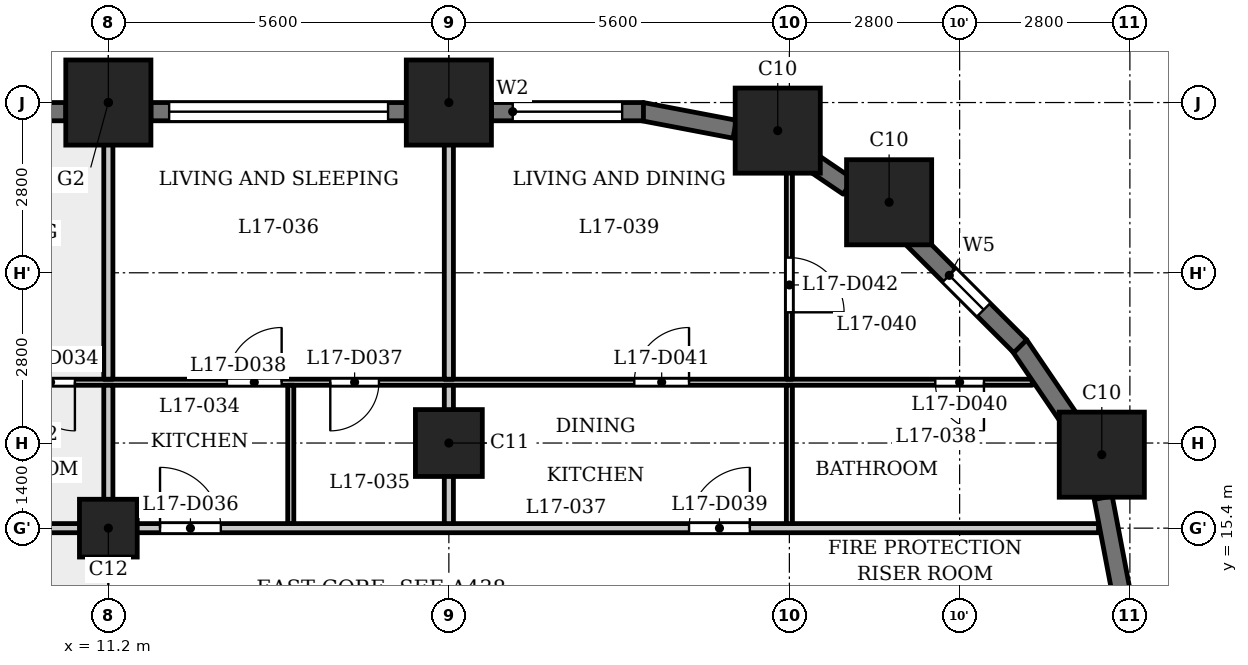
"""IFC4 building model, lengths in metres.
Left out: names, types, materials, properties, quantities, classifications, styles, units other than length and angle.
Written with IfcOpenShell. Run it as: python <this file> out.ifc"""

import sys

from ifc_helpers import new_model, si_unit, direction, frame, frame_2d, origin, origin_2d, place, context, subcontext, project, spatial, rectangle, extrude, element, fill, save


model = new_model("IFC4")
c1 = context("Model", 3, precision=1e-05, world=origin(), true_north=direction((0.0, 1.0)))
c2 = subcontext(c1, "Body", "Model", "MODEL_VIEW")
j1 = project(units=[si_unit("LENGTHUNIT", "METRE"), si_unit("PLANEANGLEUNIT", "RADIAN")], contexts=[c1])
p1 = place(None, origin())
s1 = spatial("IfcSite", under=j1, at=p1, CompositionType="ELEMENT")
p2 = place(p1, origin())
s2 = spatial("IfcBuilding", under=s1, at=p2, CompositionType="ELEMENT")
p3 = place(p2, frame((0.0, 0.0, 69.0)))
s3 = spatial("IfcBuildingStorey", under=s2, at=p3, CompositionType="ELEMENT", Elevation=69.0)
for number, where, z_axis, x_axis in (
    (1, (27.538, 16.609, 0.0), (0.0, 0.0, 1.0), (1.0, 0.0, 0.0)),
    (2, (24.04, 20.76, 0.0), (0.0, 0.0, 1.0), (1.0, 0.0, 0.0)),
    (3, (22.209, 21.938, 0.0), (0.0, 0.0, 1.0), (1.0, 0.0, 0.0)),
    (4, (16.8, 22.4, 0.0), (0.0, 0.0, 1.0), (1.0, 0.0, 0.0)),
    (5, (11.2, 22.4, 0.0), (0.0, 0.0, 1.0), (1.0, 0.0, 0.0)),
):
    element("IfcColumn", number, at=place(p3, frame(where, z_axis=z_axis, x_axis=x_axis)), inside=s3, PredefinedType="COLUMN", context=c2, shape_type="SweptSolid", body=[
        extrude(rectangle(XDim=1.4, YDim=1.4, at=origin_2d()), origin(), (0.0, 0.0, 1.0), 3.5),
    ])
p4 = place(p3, frame((16.8, 16.8, 0.0), z_axis=(0.0, 0.0, 1.0), x_axis=(1.0, 0.0, 0.0)))
e6 = element("IfcColumn", 6, at=p4, inside=s3, PredefinedType="COLUMN", context=c2, shape_type="SweptSolid", body=[
    extrude(rectangle(XDim=1.1, YDim=1.1, at=origin_2d()), origin(), (0.0, 0.0, 1.0), 3.5),
])
p5 = place(p3, frame((11.2, 15.4, 0.0), z_axis=(0.0, 0.0, 1.0), x_axis=(1.0, 0.0, 0.0)))
e7 = element("IfcColumn", 7, at=p5, inside=s3, PredefinedType="COLUMN", context=c2, shape_type="SweptSolid", body=[
    extrude(rectangle(XDim=0.95, YDim=0.95, at=origin_2d()), origin(), (0.0, 0.0, 1.0), 3.5),
])
for number, where, z_axis, x_axis in (
    (8, (27.853, 14.372, 0.0), (0.0, 0.0, 1.0), (-0.187, 0.982, 0.0)),
    (9, (27.053, 17.126, 0.0), (0.0, 0.0, 1.0), (-0.562, 0.827, 0.0)),
):
    element("IfcWall", number, at=place(p3, frame(where, z_axis=z_axis, x_axis=x_axis)), inside=s3, PredefinedType="SOLIDWALL", context=c2, shape_type="SweptSolid", body=[
        extrude(rectangle(XDim=1.556, YDim=0.3, at=frame_2d((0.778, 0.0))), origin(), (0.0, 0.0, 1.0), 2.3),
    ])
p6 = place(p3, frame((26.197, 18.391, 0.0), z_axis=(0.0, 0.0, 1.0), x_axis=(-0.707057949532, 0.707155609469, 0.0)))
e10 = element("IfcWall", 10, at=p6, inside=s3, PredefinedType="SOLIDWALL", context=c2, shape_type="SweptSolid", body=[
    extrude(rectangle(XDim=2.5, YDim=0.3, at=frame_2d((1.25, 0.0))), origin(), (0.0, 0.0, 1.0), 2.3),
])
p7 = place(p6, frame((0.85, 0.0, 0.6)))
e11 = element("IfcOpeningElement", 11, at=p7, cuts=e10, PredefinedType="OPENING", context=c2, shape_type="SweptSolid", body=[
    extrude(rectangle(XDim=0.8, YDim=1.55, at=frame_2d((0.4, 0.775))), frame((0.0, 0.16, 0.0), z_axis=(0.0, -1.0, 0.0), x_axis=(1.0, 0.0, 0.0)), (0.0, 0.0, 1.0), 0.32),
])
p8 = place(p3, frame((23.368, 21.017, 0.0), z_axis=(0.0, 0.0, 1.0), x_axis=(-0.827037530089, 0.562146710232, 0.0)))
e12 = element("IfcWall", 12, at=p8, inside=s3, PredefinedType="SOLIDWALL", context=c2, shape_type="SweptSolid", body=[
    extrude(rectangle(XDim=0.777, YDim=0.3, at=frame_2d((0.388, 0.0))), origin(), (0.0, 0.0, 1.0), 3.15),
])
p9 = place(p3, frame((21.5, 21.961, 0.0), z_axis=(0.0, 0.0, 1.0), x_axis=(-0.982297345734, 0.187328386968, 0.0)))
e13 = element("IfcWall", 13, at=p9, inside=s3, PredefinedType="SOLIDWALL", context=c2, shape_type="SweptSolid", body=[
    extrude(rectangle(XDim=1.556, YDim=0.3, at=frame_2d((0.778, 0.0))), origin(), (0.0, 0.0, 1.0), 2.3),
])
p10 = place(p3, frame((20.0, 22.25, 0.0), z_axis=(0.0, 0.0, 1.0), x_axis=(-1.0, 0.0, 0.0)))
e14 = element("IfcWall", 14, at=p10, inside=s3, PredefinedType="SOLIDWALL", context=c2, shape_type="SweptSolid", body=[
    extrude(rectangle(XDim=2.5, YDim=0.3, at=frame_2d((1.25, 0.0))), origin(), (0.0, 0.0, 1.0), 2.3),
])
p11 = place(p10, frame((0.35, 0.0, 0.9)))
e15 = element("IfcOpeningElement", 15, at=p11, cuts=e14, PredefinedType="OPENING", context=c2, shape_type="SweptSolid", body=[
    extrude(rectangle(XDim=1.8, YDim=1.25, at=frame_2d((0.9, 0.625))), frame((0.0, 0.16, 0.0), z_axis=(0.0, -1.0, 0.0), x_axis=(1.0, 0.0, 0.0)), (0.0, 0.0, 1.0), 0.32),
])
p12 = place(p3, frame((16.1, 22.25, 0.0), z_axis=(0.0, 0.0, 1.0), x_axis=(-1.0, 0.0, 0.0)))
e16 = element("IfcWall", 16, at=p12, inside=s3, PredefinedType="SOLIDWALL", context=c2, shape_type="SweptSolid", body=[
    extrude(rectangle(XDim=4.2, YDim=0.3, at=frame_2d((2.1, 0.0))), origin(), (0.0, 0.0, 1.0), 2.3),
])
p13 = place(p12, frame((0.3, 0.0, 1.2)))
e17 = element("IfcOpeningElement", 17, at=p13, cuts=e16, PredefinedType="OPENING", context=c2, shape_type="SweptSolid", body=[
    extrude(rectangle(XDim=3.6, YDim=0.95, at=frame_2d((1.8, 0.475))), frame((0.0, 0.16, 0.0), z_axis=(0.0, -1.0, 0.0), x_axis=(1.0, 0.0, 0.0)), (0.0, 0.0, 1.0), 0.32),
])
p14 = place(p3, frame((10.5, 22.25, 0.0), z_axis=(0.0, 0.0, 1.0), x_axis=(-1.0, 0.0, 0.0)))
e18 = element("IfcWall", 18, at=p14, inside=s3, PredefinedType="SOLIDWALL", context=c2, shape_type="SweptSolid", body=[
    extrude(rectangle(XDim=4.2, YDim=0.3, at=frame_2d((2.1, 0.0))), origin(), (0.0, 0.0, 1.0), 2.3),
])
p15 = place(p14, frame((0.3, 0.0, 1.2)))
e19 = element("IfcOpeningElement", 19, at=p15, cuts=e18, PredefinedType="OPENING", context=c2, shape_type="SweptSolid", body=[
    extrude(rectangle(XDim=3.6, YDim=0.95, at=frame_2d((1.8, 0.475))), frame((0.0, 0.16, 0.0), z_axis=(0.0, -1.0, 0.0), x_axis=(1.0, 0.0, 0.0)), (0.0, 0.0, 1.0), 0.32),
])
p16 = place(p3, frame((-27.484, 15.4, 0.0), z_axis=(0.0, 0.0, 1.0), x_axis=(1.0, 0.0, 0.0)))
e20 = element("IfcWall", 20, at=p16, inside=s3, PredefinedType="PARTITIONING", context=c2, shape_type="SweptSolid", body=[
    extrude(rectangle(XDim=54.968, YDim=0.15, at=frame_2d((27.484, 0.0))), origin(), (0.0, 0.0, 1.0), 3.15),
])
p17 = place(p16, frame((8.784, 0.0, 0.0)))
e21 = element("IfcOpeningElement", 21, at=p17, cuts=e20, PredefinedType="OPENING", context=c2, shape_type="SweptSolid", body=[
    extrude(rectangle(XDim=1.0, YDim=2.1, at=frame_2d((0.5, 1.05))), frame((0.0, 0.085, 0.0), z_axis=(0.0, -1.0, 0.0), x_axis=(1.0, 0.0, 0.0)), (0.0, 0.0, 1.0), 0.17),
])
p18 = place(p16, frame((14.634, 0.0, 0.0)))
e22 = element("IfcOpeningElement", 22, at=p18, cuts=e20, PredefinedType="OPENING", context=c2, shape_type="SweptSolid", body=[
    extrude(rectangle(XDim=1.0, YDim=2.1, at=frame_2d((0.5, 1.05))), frame((0.0, 0.085, 0.0), z_axis=(0.0, -1.0, 0.0), x_axis=(1.0, 0.0, 0.0)), (0.0, 0.0, 1.0), 0.17),
])
p19 = place(p16, frame((19.484, 0.0, 0.0)))
e23 = element("IfcOpeningElement", 23, at=p19, cuts=e20, PredefinedType="OPENING", context=c2, shape_type="SweptSolid", body=[
    extrude(rectangle(XDim=1.0, YDim=2.1, at=frame_2d((0.5, 1.05))), frame((0.0, 0.085, 0.0), z_axis=(0.0, -1.0, 0.0), x_axis=(1.0, 0.0, 0.0)), (0.0, 0.0, 1.0), 0.17),
])
p20 = place(p16, frame((23.634, 0.0, 0.0)))
e24 = element("IfcOpeningElement", 24, at=p20, cuts=e20, PredefinedType="OPENING", context=c2, shape_type="SweptSolid", body=[
    extrude(rectangle(XDim=1.0, YDim=2.1, at=frame_2d((0.5, 1.05))), frame((0.0, 0.085, 0.0), z_axis=(0.0, -1.0, 0.0), x_axis=(1.0, 0.0, 0.0)), (0.0, 0.0, 1.0), 0.17),
])
p21 = place(p16, frame((28.234, 0.0, 0.0)))
e25 = element("IfcOpeningElement", 25, at=p21, cuts=e20, PredefinedType="OPENING", context=c2, shape_type="SweptSolid", body=[
    extrude(rectangle(XDim=1.0, YDim=2.1, at=frame_2d((0.5, 1.05))), frame((0.0, 0.085, 0.0), z_axis=(0.0, -1.0, 0.0), x_axis=(1.0, 0.0, 0.0)), (0.0, 0.0, 1.0), 0.17),
])
p22 = place(p16, frame((33.784, 0.0, 0.0)))
e26 = element("IfcOpeningElement", 26, at=p22, cuts=e20, PredefinedType="OPENING", context=c2, shape_type="SweptSolid", body=[
    extrude(rectangle(XDim=1.0, YDim=2.1, at=frame_2d((0.5, 1.05))), frame((0.0, 0.085, 0.0), z_axis=(0.0, -1.0, 0.0), x_axis=(1.0, 0.0, 0.0)), (0.0, 0.0, 1.0), 0.17),
])
p23 = place(p16, frame((39.534, 0.0, 0.0)))
e27 = element("IfcOpeningElement", 27, at=p23, cuts=e20, PredefinedType="OPENING", context=c2, shape_type="SweptSolid", body=[
    extrude(rectangle(XDim=1.0, YDim=2.1, at=frame_2d((0.5, 1.05))), frame((0.0, 0.085, 0.0), z_axis=(0.0, -1.0, 0.0), x_axis=(1.0, 0.0, 0.0)), (0.0, 0.0, 1.0), 0.17),
])
p24 = place(p16, frame((48.234, 0.0, 0.0)))
e28 = element("IfcOpeningElement", 28, at=p24, cuts=e20, PredefinedType="OPENING", context=c2, shape_type="SweptSolid", body=[
    extrude(rectangle(XDim=1.0, YDim=2.1, at=frame_2d((0.5, 1.05))), frame((0.0, 0.085, 0.0), z_axis=(0.0, -1.0, 0.0), x_axis=(1.0, 0.0, 0.0)), (0.0, 0.0, 1.0), 0.17),
])
p25 = place(p3, frame((-26.64, 17.8, 0.0), z_axis=(0.0, 0.0, 1.0), x_axis=(1.0, 0.0, 0.0)))
e29 = element("IfcWall", 29, at=p25, inside=s3, PredefinedType="PARTITIONING", context=c2, shape_type="SweptSolid", body=[
    extrude(rectangle(XDim=53.034, YDim=0.1, at=frame_2d((26.517, 0.0))), origin(), (0.0, 0.0, 1.0), 3.15),
])
p26 = place(p25, frame((2.872, 0.0, 0.0)))
e30 = element("IfcOpeningElement", 30, at=p26, cuts=e29, PredefinedType="OPENING", context=c2, shape_type="SweptSolid", body=[
    extrude(rectangle(XDim=0.8, YDim=2.1, at=frame_2d((0.4, 1.05))), frame((0.0, 0.06, 0.0), z_axis=(0.0, -1.0, 0.0), x_axis=(1.0, 0.0, 0.0)), (0.0, 0.0, 1.0), 0.12),
])
p27 = place(p25, frame((7.04, 0.0, 0.0)))
e31 = element("IfcOpeningElement", 31, at=p27, cuts=e29, PredefinedType="OPENING", context=c2, shape_type="SweptSolid", body=[
    extrude(rectangle(XDim=0.9, YDim=2.1, at=frame_2d((0.45, 1.05))), frame((0.0, 0.06, 0.0), z_axis=(0.0, -1.0, 0.0), x_axis=(1.0, 0.0, 0.0)), (0.0, 0.0, 1.0), 0.12),
])
p28 = place(p25, frame((10.74, 0.0, 0.0)))
e32 = element("IfcOpeningElement", 32, at=p28, cuts=e29, PredefinedType="OPENING", context=c2, shape_type="SweptSolid", body=[
    extrude(rectangle(XDim=0.8, YDim=2.1, at=frame_2d((0.4, 1.05))), frame((0.0, 0.06, 0.0), z_axis=(0.0, -1.0, 0.0), x_axis=(1.0, 0.0, 0.0)), (0.0, 0.0, 1.0), 0.12),
])
p29 = place(p25, frame((12.89, 0.0, 0.0)))
e33 = element("IfcOpeningElement", 33, at=p29, cuts=e29, PredefinedType="OPENING", context=c2, shape_type="SweptSolid", body=[
    extrude(rectangle(XDim=0.9, YDim=2.1, at=frame_2d((0.45, 1.05))), frame((0.0, 0.06, 0.0), z_axis=(0.0, -1.0, 0.0), x_axis=(1.0, 0.0, 0.0)), (0.0, 0.0, 1.0), 0.12),
])
p30 = place(p25, frame((16.34, 0.0, 0.0)))
e34 = element("IfcOpeningElement", 34, at=p30, cuts=e29, PredefinedType="OPENING", context=c2, shape_type="SweptSolid", body=[
    extrude(rectangle(XDim=0.8, YDim=2.1, at=frame_2d((0.4, 1.05))), frame((0.0, 0.06, 0.0), z_axis=(0.0, -1.0, 0.0), x_axis=(1.0, 0.0, 0.0)), (0.0, 0.0, 1.0), 0.12),
])
p31 = place(p25, frame((19.74, 0.0, 0.0)))
e35 = element("IfcOpeningElement", 35, at=p31, cuts=e29, PredefinedType="OPENING", context=c2, shape_type="SweptSolid", body=[
    extrude(rectangle(XDim=0.9, YDim=2.1, at=frame_2d((0.45, 1.05))), frame((0.0, 0.06, 0.0), z_axis=(0.0, -1.0, 0.0), x_axis=(1.0, 0.0, 0.0)), (0.0, 0.0, 1.0), 0.12),
])
p32 = place(p25, frame((25.09, 0.0, 0.0)))
e36 = element("IfcOpeningElement", 36, at=p32, cuts=e29, PredefinedType="OPENING", context=c2, shape_type="SweptSolid", body=[
    extrude(rectangle(XDim=0.8, YDim=2.1, at=frame_2d((0.4, 1.05))), frame((0.0, 0.06, 0.0), z_axis=(0.0, -1.0, 0.0), x_axis=(1.0, 0.0, 0.0)), (0.0, 0.0, 1.0), 0.12),
])
p33 = place(p25, frame((21.89, 0.0, 0.0)))
e37 = element("IfcOpeningElement", 37, at=p33, cuts=e29, PredefinedType="OPENING", context=c2, shape_type="SweptSolid", body=[
    extrude(rectangle(XDim=0.9, YDim=2.1, at=frame_2d((0.45, 1.05))), frame((0.0, 0.06, 0.0), z_axis=(0.0, -1.0, 0.0), x_axis=(1.0, 0.0, 0.0)), (0.0, 0.0, 1.0), 0.12),
])
p34 = place(p25, frame((30.69, 0.0, 0.0)))
e38 = element("IfcOpeningElement", 38, at=p34, cuts=e29, PredefinedType="OPENING", context=c2, shape_type="SweptSolid", body=[
    extrude(rectangle(XDim=0.8, YDim=2.1, at=frame_2d((0.4, 1.05))), frame((0.0, 0.06, 0.0), z_axis=(0.0, -1.0, 0.0), x_axis=(1.0, 0.0, 0.0)), (0.0, 0.0, 1.0), 0.12),
])
p35 = place(p25, frame((28.49, 0.0, 0.0)))
e39 = element("IfcOpeningElement", 39, at=p35, cuts=e29, PredefinedType="OPENING", context=c2, shape_type="SweptSolid", body=[
    extrude(rectangle(XDim=0.9, YDim=2.1, at=frame_2d((0.45, 1.05))), frame((0.0, 0.06, 0.0), z_axis=(0.0, -1.0, 0.0), x_axis=(1.0, 0.0, 0.0)), (0.0, 0.0, 1.0), 0.12),
])
p36 = place(p25, frame((36.49, 0.0, 0.0)))
e40 = element("IfcOpeningElement", 40, at=p36, cuts=e29, PredefinedType="OPENING", context=c2, shape_type="SweptSolid", body=[
    extrude(rectangle(XDim=0.8, YDim=2.1, at=frame_2d((0.4, 1.05))), frame((0.0, 0.06, 0.0), z_axis=(0.0, -1.0, 0.0), x_axis=(1.0, 0.0, 0.0)), (0.0, 0.0, 1.0), 0.12),
])
p37 = place(p25, frame((33.04, 0.0, 0.0)))
e41 = element("IfcOpeningElement", 41, at=p37, cuts=e29, PredefinedType="OPENING", context=c2, shape_type="SweptSolid", body=[
    extrude(rectangle(XDim=0.9, YDim=2.1, at=frame_2d((0.45, 1.05))), frame((0.0, 0.06, 0.0), z_axis=(0.0, -1.0, 0.0), x_axis=(1.0, 0.0, 0.0)), (0.0, 0.0, 1.0), 0.12),
])
p38 = place(p25, frame((41.49, 0.0, 0.0)))
e42 = element("IfcOpeningElement", 42, at=p38, cuts=e29, PredefinedType="OPENING", context=c2, shape_type="SweptSolid", body=[
    extrude(rectangle(XDim=0.8, YDim=2.1, at=frame_2d((0.4, 1.05))), frame((0.0, 0.06, 0.0), z_axis=(0.0, -1.0, 0.0), x_axis=(1.0, 0.0, 0.0)), (0.0, 0.0, 1.0), 0.12),
])
p39 = place(p25, frame((39.79, 0.0, 0.0)))
e43 = element("IfcOpeningElement", 43, at=p39, cuts=e29, PredefinedType="OPENING", context=c2, shape_type="SweptSolid", body=[
    extrude(rectangle(XDim=0.9, YDim=2.1, at=frame_2d((0.45, 1.05))), frame((0.0, 0.06, 0.0), z_axis=(0.0, -1.0, 0.0), x_axis=(1.0, 0.0, 0.0)), (0.0, 0.0, 1.0), 0.12),
])
p40 = place(p25, frame((51.44, 0.0, 0.0)))
e44 = element("IfcOpeningElement", 44, at=p40, cuts=e29, PredefinedType="OPENING", context=c2, shape_type="SweptSolid", body=[
    extrude(rectangle(XDim=0.8, YDim=2.1, at=frame_2d((0.4, 1.05))), frame((0.0, 0.06, 0.0), z_axis=(0.0, -1.0, 0.0), x_axis=(1.0, 0.0, 0.0)), (0.0, 0.0, 1.0), 0.12),
])
p41 = place(p25, frame((46.49, 0.0, 0.0)))
e45 = element("IfcOpeningElement", 45, at=p41, cuts=e29, PredefinedType="OPENING", context=c2, shape_type="SweptSolid", body=[
    extrude(rectangle(XDim=0.9, YDim=2.1, at=frame_2d((0.45, 1.05))), frame((0.0, 0.06, 0.0), z_axis=(0.0, -1.0, 0.0), x_axis=(1.0, 0.0, 0.0)), (0.0, 0.0, 1.0), 0.12),
])
p42 = place(p3, frame((11.2, 15.475, 0.0), z_axis=(0.0, 0.0, 1.0), x_axis=(0.0, 1.0, 0.0)))
e46 = element("IfcWall", 46, at=p42, inside=s3, PredefinedType="PARTITIONING", context=c2, shape_type="SweptSolid", body=[
    extrude(rectangle(XDim=2.275, YDim=0.15, at=frame_2d((1.137, 0.0))), origin(), (0.0, 0.0, 1.0), 3.15),
])
p43 = place(p3, frame((11.2, 17.85, 0.0), z_axis=(0.0, 0.0, 1.0), x_axis=(0.0, 1.0, 0.0)))
e47 = element("IfcWall", 47, at=p43, inside=s3, PredefinedType="PARTITIONING", context=c2, shape_type="SweptSolid", body=[
    extrude(rectangle(XDim=5.23, YDim=0.15, at=frame_2d((2.615, 0.0))), origin(), (0.0, 0.0, 1.0), 3.15),
])
p44 = place(p3, frame((14.2, 15.475, 0.0), z_axis=(0.0, 0.0, 1.0), x_axis=(0.0, 1.0, 0.0)))
e48 = element("IfcWall", 48, at=p44, inside=s3, PredefinedType="PARTITIONING", context=c2, shape_type="SweptSolid", body=[
    extrude(rectangle(XDim=2.275, YDim=0.1, at=frame_2d((1.137, 0.0))), origin(), (0.0, 0.0, 1.0), 3.15),
])
p45 = place(p3, frame((16.8, 15.475, 0.0), z_axis=(0.0, 0.0, 1.0), x_axis=(0.0, 1.0, 0.0)))
e49 = element("IfcWall", 49, at=p45, inside=s3, PredefinedType="PARTITIONING", context=c2, shape_type="SweptSolid", body=[
    extrude(rectangle(XDim=2.275, YDim=0.15, at=frame_2d((1.137, 0.0))), origin(), (0.0, 0.0, 1.0), 3.15),
])
p46 = place(p3, frame((16.8, 17.85, 0.0), z_axis=(0.0, 0.0, 1.0), x_axis=(0.0, 1.0, 0.0)))
e50 = element("IfcWall", 50, at=p46, inside=s3, PredefinedType="PARTITIONING", context=c2, shape_type="SweptSolid", body=[
    extrude(rectangle(XDim=5.23, YDim=0.15, at=frame_2d((2.615, 0.0))), origin(), (0.0, 0.0, 1.0), 3.15),
])
p47 = place(p3, frame((22.4, 15.475, 0.0), z_axis=(0.0, 0.0, 1.0), x_axis=(0.0, 1.0, 0.0)))
e51 = element("IfcWall", 51, at=p47, inside=s3, PredefinedType="PARTITIONING", context=c2, shape_type="SweptSolid", body=[
    extrude(rectangle(XDim=2.275, YDim=0.1, at=frame_2d((1.137, 0.0))), origin(), (0.0, 0.0, 1.0), 3.15),
])
p48 = place(p3, frame((22.4, 17.85, 0.0), z_axis=(0.0, 0.0, 1.0), x_axis=(0.0, 1.0, 0.0)))
e52 = element("IfcWall", 52, at=p48, inside=s3, PredefinedType="PARTITIONING", context=c2, shape_type="SweptSolid", body=[
    extrude(rectangle(XDim=3.87, YDim=0.1, at=frame_2d((1.935, 0.0))), origin(), (0.0, 0.0, 1.0), 3.15),
])
p49 = place(p48, frame((1.1, 0.0, 0.0)))
e53 = element("IfcOpeningElement", 53, at=p49, cuts=e52, PredefinedType="OPENING", context=c2, shape_type="SweptSolid", body=[
    extrude(rectangle(XDim=0.9, YDim=2.1, at=frame_2d((0.45, 1.05))), frame((0.0, 0.06, 0.0), z_axis=(0.0, -1.0, 0.0), x_axis=(1.0, 0.0, 0.0)), (0.0, 0.0, 1.0), 0.12),
])
p50 = place(p36, origin())
e54 = element("IfcDoor", 54, at=p50, inside=s3, OperationType="SINGLE_SWING_RIGHT", PredefinedType="DOOR", context=c2, shape_type="SweptSolid", body=[
    extrude(rectangle(XDim=0.8, YDim=2.1, at=frame_2d((0.4, 1.05))), frame((0.0, 0.025, 0.0), z_axis=(0.0, -1.0, 0.0), x_axis=(1.0, 0.0, 0.0)), (0.0, 0.0, 1.0), 0.05),
])
fill(e40, e54)
p51 = place(p23, origin())
e55 = element("IfcDoor", 55, at=p51, inside=s3, OperationType="SINGLE_SWING_RIGHT", PredefinedType="DOOR", context=c2, shape_type="SweptSolid", body=[
    extrude(rectangle(XDim=1.0, YDim=2.1, at=frame_2d((0.5, 1.05))), frame((0.0, 0.025, 0.0), z_axis=(0.0, -1.0, 0.0), x_axis=(1.0, 0.0, 0.0)), (0.0, 0.0, 1.0), 0.05),
])
fill(e27, e55)
p52 = place(p38, origin())
e56 = element("IfcDoor", 56, at=p52, inside=s3, OperationType="SINGLE_SWING_LEFT", PredefinedType="DOOR", context=c2, shape_type="SweptSolid", body=[
    extrude(rectangle(XDim=0.8, YDim=2.1, at=frame_2d((0.4, 1.05))), frame((0.0, 0.025, 0.0), z_axis=(0.0, -1.0, 0.0), x_axis=(1.0, 0.0, 0.0)), (0.0, 0.0, 1.0), 0.05),
])
fill(e42, e56)
p53 = place(p39, origin())
e57 = element("IfcDoor", 57, at=p53, inside=s3, OperationType="SINGLE_SWING_LEFT", PredefinedType="DOOR", context=c2, shape_type="SweptSolid", body=[
    extrude(rectangle(XDim=0.9, YDim=2.1, at=frame_2d((0.45, 1.05))), frame((0.0, 0.025, 0.0), z_axis=(0.0, -1.0, 0.0), x_axis=(1.0, 0.0, 0.0)), (0.0, 0.0, 1.0), 0.05),
])
fill(e43, e57)
p54 = place(p24, origin())
e58 = element("IfcDoor", 58, at=p54, inside=s3, OperationType="SINGLE_SWING_LEFT", PredefinedType="DOOR", context=c2, shape_type="SweptSolid", body=[
    extrude(rectangle(XDim=1.0, YDim=2.1, at=frame_2d((0.5, 1.05))), frame((0.0, 0.025, 0.0), z_axis=(0.0, -1.0, 0.0), x_axis=(1.0, 0.0, 0.0)), (0.0, 0.0, 1.0), 0.05),
])
fill(e28, e58)
p55 = place(p40, origin())
e59 = element("IfcDoor", 59, at=p55, inside=s3, OperationType="SINGLE_SWING_RIGHT", PredefinedType="DOOR", context=c2, shape_type="SweptSolid", body=[
    extrude(rectangle(XDim=0.8, YDim=2.1, at=frame_2d((0.4, 1.05))), frame((0.0, 0.025, 0.0), z_axis=(0.0, -1.0, 0.0), x_axis=(1.0, 0.0, 0.0)), (0.0, 0.0, 1.0), 0.05),
])
fill(e44, e59)
p56 = place(p41, origin())
e60 = element("IfcDoor", 60, at=p56, inside=s3, OperationType="SINGLE_SWING_LEFT", PredefinedType="DOOR", context=c2, shape_type="SweptSolid", body=[
    extrude(rectangle(XDim=0.9, YDim=2.1, at=frame_2d((0.45, 1.05))), frame((0.0, 0.025, 0.0), z_axis=(0.0, -1.0, 0.0), x_axis=(1.0, 0.0, 0.0)), (0.0, 0.0, 1.0), 0.05),
])
fill(e45, e60)
p57 = place(p49, origin())
e61 = element("IfcDoor", 61, at=p57, inside=s3, OperationType="SINGLE_SWING_LEFT", PredefinedType="DOOR", context=c2, shape_type="SweptSolid", body=[
    extrude(rectangle(XDim=0.9, YDim=2.1, at=frame_2d((0.45, 1.05))), frame((0.0, 0.025, 0.0), z_axis=(0.0, -1.0, 0.0), x_axis=(1.0, 0.0, 0.0)), (0.0, 0.0, 1.0), 0.05),
])
fill(e53, e61)
p58 = place(p7, origin())
e62 = element("IfcWindow", 62, at=p58, inside=s3, PartitioningType="SINGLE_PANEL", PredefinedType="WINDOW", context=c2, shape_type="SweptSolid", body=[
    extrude(rectangle(XDim=0.8, YDim=1.55, at=frame_2d((0.4, 0.775))), frame((0.0, 0.03, 0.0), z_axis=(0.0, -1.0, 0.0), x_axis=(1.0, 0.0, 0.0)), (0.0, 0.0, 1.0), 0.06),
])
fill(e11, e62)
p59 = place(p11, origin())
e63 = element("IfcWindow", 63, at=p59, inside=s3, PartitioningType="SINGLE_PANEL", PredefinedType="WINDOW", context=c2, shape_type="SweptSolid", body=[
    extrude(rectangle(XDim=1.8, YDim=1.25, at=frame_2d((0.9, 0.625))), frame((0.0, 0.03, 0.0), z_axis=(0.0, -1.0, 0.0), x_axis=(1.0, 0.0, 0.0)), (0.0, 0.0, 1.0), 0.06),
])
fill(e15, e63)
p60 = place(p13, origin())
e64 = element("IfcWindow", 64, at=p60, inside=s3, PartitioningType="SINGLE_PANEL", PredefinedType="WINDOW", context=c2, shape_type="SweptSolid", body=[
    extrude(rectangle(XDim=3.6, YDim=0.95, at=frame_2d((1.8, 0.475))), frame((0.0, 0.03, 0.0), z_axis=(0.0, -1.0, 0.0), x_axis=(1.0, 0.0, 0.0)), (0.0, 0.0, 1.0), 0.06),
])
fill(e17, e64)
save(model, sys.argv[1])
